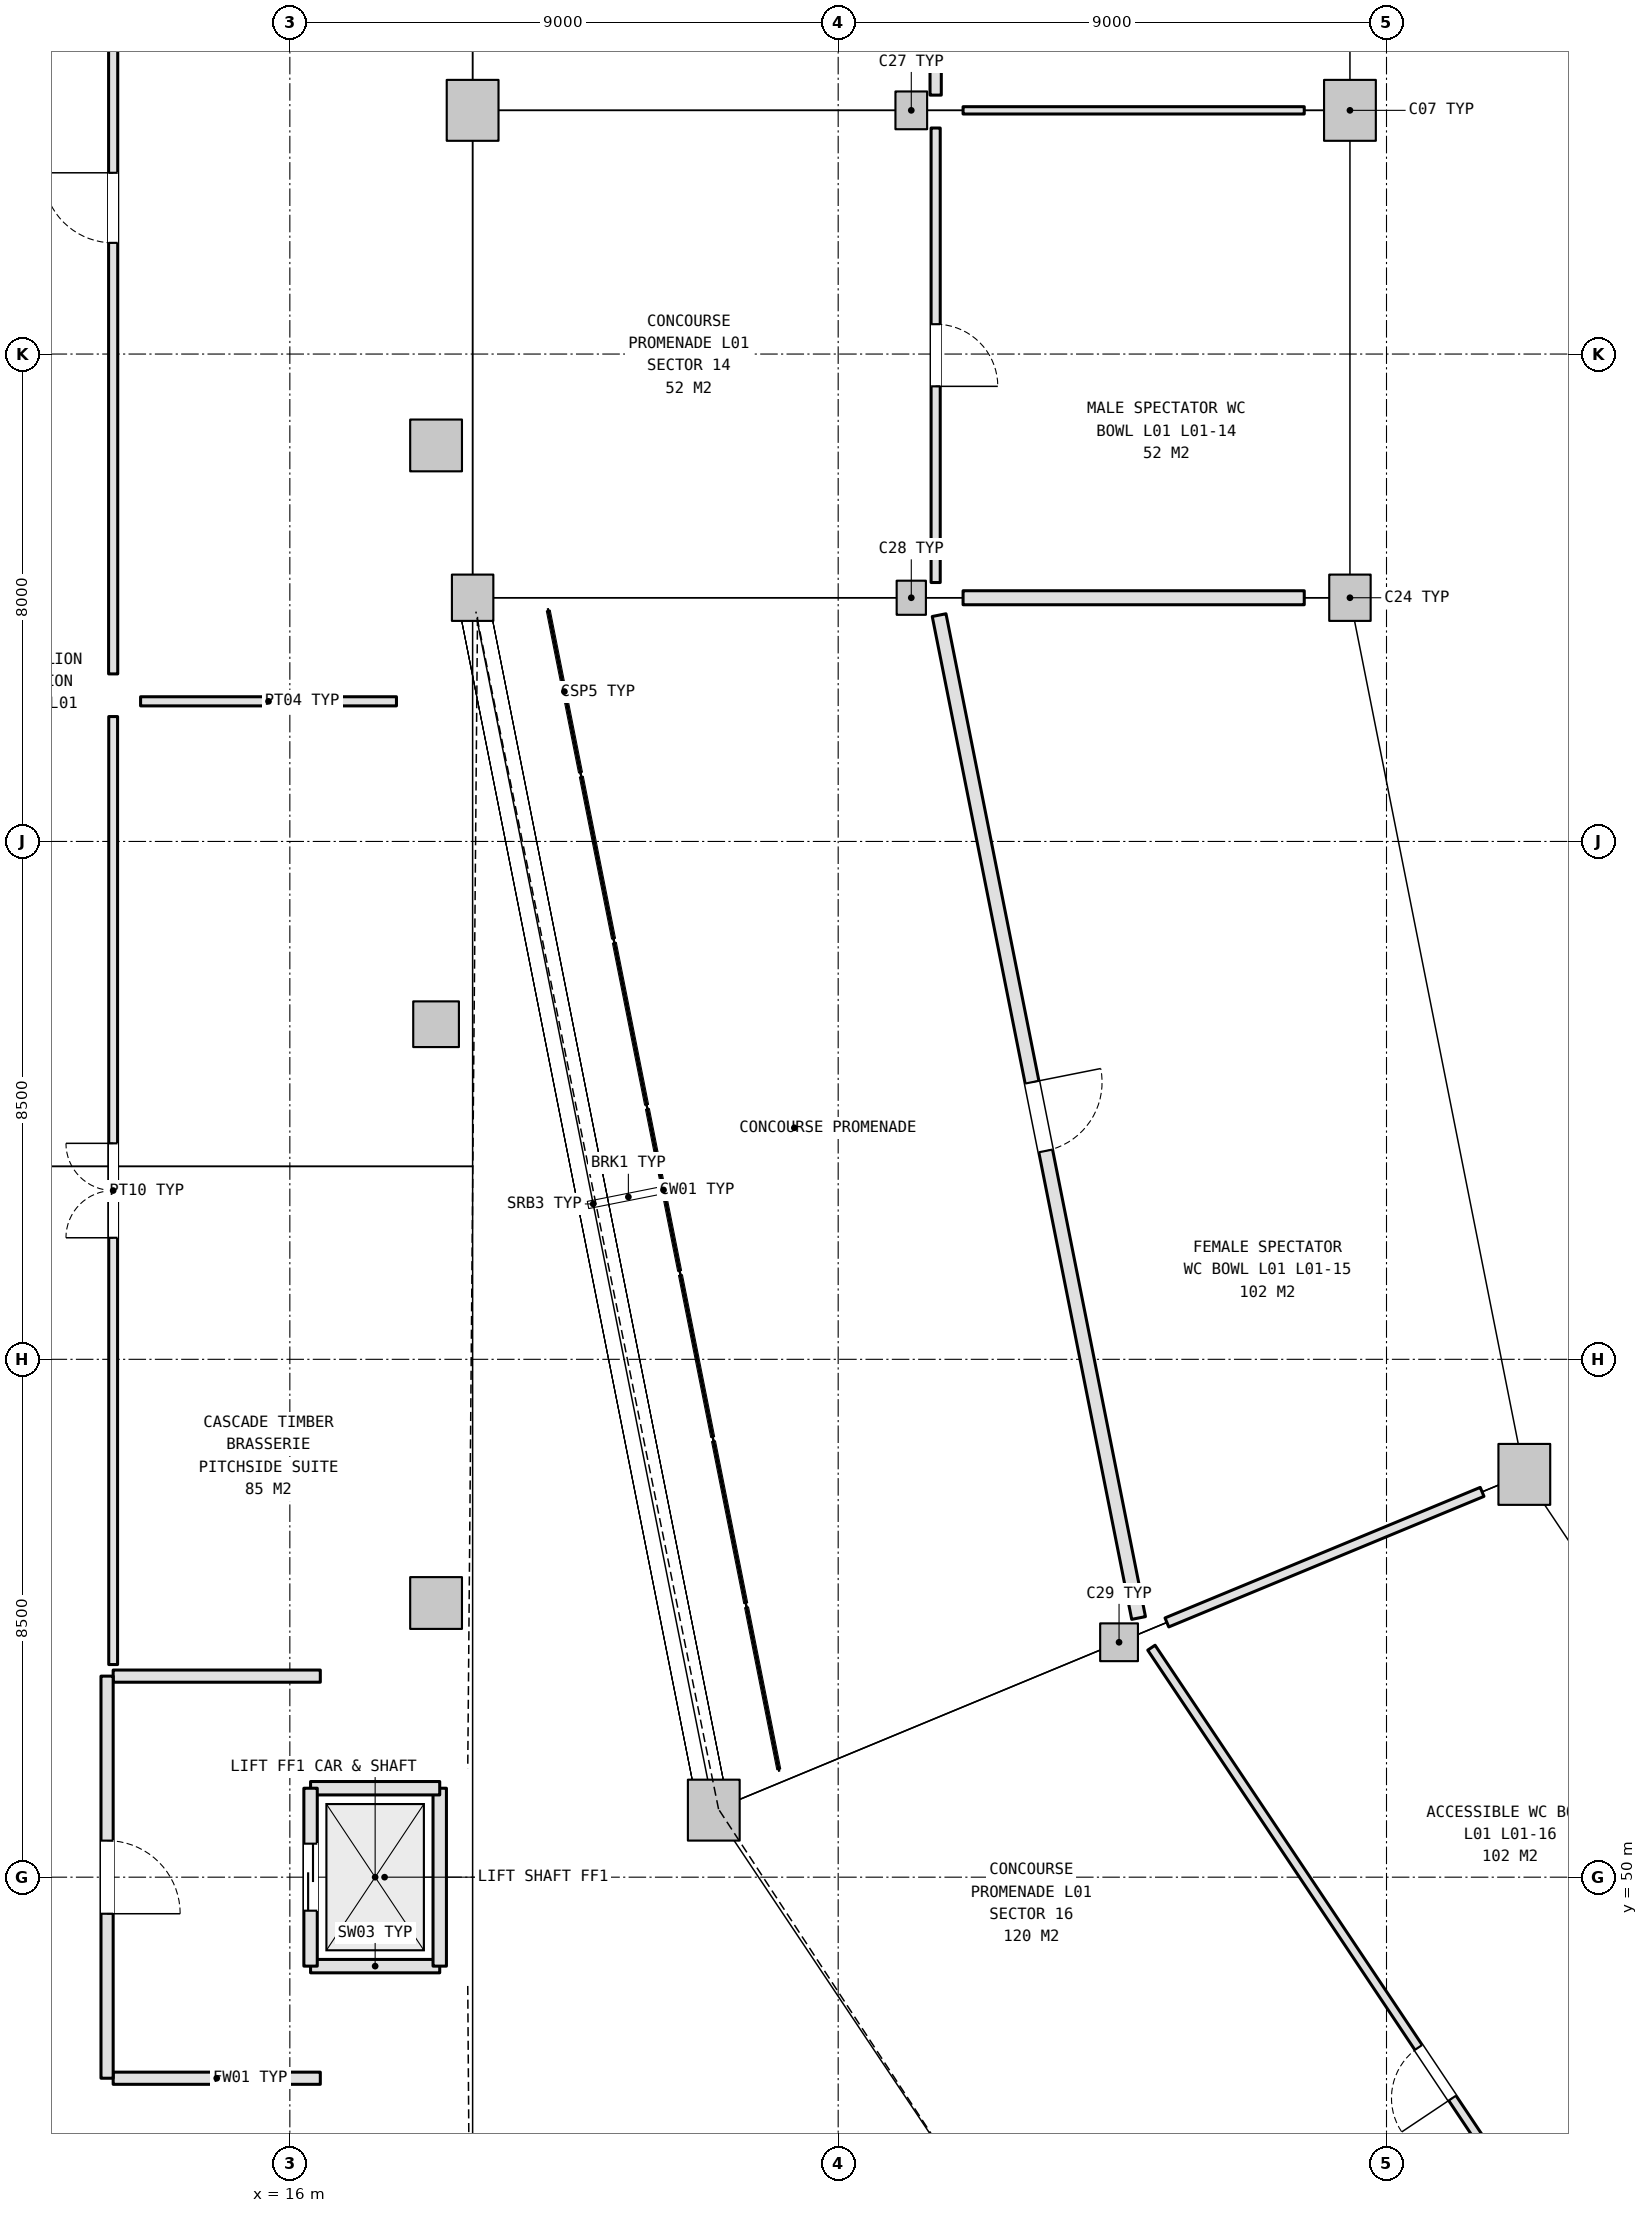
"""IFC4 building model, lengths in metres.
Left out: names, types, materials, properties, quantities, classifications, styles, units other than length and angle.
Written with IfcOpenShell. Run it as: python <this file> out.ifc"""

import sys

from ifc_helpers import new_model, si_unit, direction, frame, frame_2d, origin, origin_2d, place, context, subcontext, project, spatial, rectangle, extrude, element, fill, save


model = new_model("IFC4")
c1 = context("Model", 3, precision=1e-05, world=origin(), true_north=direction((0.0, 1.0)))
c2 = subcontext(c1, "Body", "Model", "MODEL_VIEW")
j1 = project(units=[si_unit("LENGTHUNIT", "METRE"), si_unit("PLANEANGLEUNIT", "RADIAN")], contexts=[c1])
p1 = place(None, origin())
s1 = spatial("IfcSite", under=j1, at=p1, CompositionType="ELEMENT")
p2 = place(p1, origin())
s2 = spatial("IfcBuilding", under=s1, at=p2, CompositionType="ELEMENT")
p3 = place(p2, frame((0.0, 0.0, 5.4)))
s3 = spatial("IfcBuildingStorey", under=s2, at=p3, CompositionType="ELEMENT", Elevation=5.4)
p4 = place(p3, frame((33.4, 79.0, 0.0), z_axis=(0.0, 0.0, 1.0), x_axis=(1.0, 0.0, 0.0)))
e1 = element("IfcColumn", 1, at=p4, inside=s3, PredefinedType="COLUMN", context=c2, shape_type="SweptSolid", body=[
    extrude(rectangle(XDim=0.85, YDim=1.0, at=origin_2d()), origin(), (0.0, 0.0, 1.0), 5.4),
])
p5 = place(p3, frame((26.2, 79.0, 0.0), z_axis=(0.0, 0.0, 1.0), x_axis=(1.0, 0.0, 0.0)))
e2 = element("IfcColumn", 2, at=p5, inside=s3, PredefinedType="COLUMN", context=c2, shape_type="SweptSolid", body=[
    extrude(rectangle(XDim=0.52, YDim=0.62, at=origin_2d()), origin(), (0.0, 0.0, 1.0), 5.4),
])
p6 = place(p3, frame((19.0, 79.0, 0.0), z_axis=(0.0, 0.0, 1.0), x_axis=(1.0, 0.0, 0.0)))
e3 = element("IfcColumn", 3, at=p6, inside=s3, PredefinedType="COLUMN", context=c2, shape_type="SweptSolid", body=[
    extrude(rectangle(XDim=0.85, YDim=1.0, at=origin_2d()), origin(), (0.0, 0.0, 1.0), 5.4),
])
p7 = place(p3, frame((33.4, 71.0, 0.0), z_axis=(0.0, 0.0, 1.0), x_axis=(1.0, 0.0, 0.0)))
e4 = element("IfcColumn", 4, at=p7, inside=s3, PredefinedType="COLUMN", context=c2, shape_type="SweptSolid", body=[
    extrude(rectangle(XDim=0.68, YDim=0.76, at=origin_2d()), origin(), (0.0, 0.0, 1.0), 5.4),
])
p8 = place(p3, frame((26.2, 71.0, 0.0), z_axis=(0.0, 0.0, 1.0), x_axis=(1.0, 0.0, 0.0)))
e5 = element("IfcColumn", 5, at=p8, inside=s3, PredefinedType="COLUMN", context=c2, shape_type="SweptSolid", body=[
    extrude(rectangle(XDim=0.48, YDim=0.56, at=origin_2d()), origin(), (0.0, 0.0, 1.0), 5.4),
])
p9 = place(p3, frame((19.0, 71.0, 0.0), z_axis=(0.0, 0.0, 1.0), x_axis=(1.0, 0.0, 0.0)))
e6 = element("IfcColumn", 6, at=p9, inside=s3, PredefinedType="COLUMN", context=c2, shape_type="SweptSolid", body=[
    extrude(rectangle(XDim=0.68, YDim=0.76, at=origin_2d()), origin(), (0.0, 0.0, 1.0), 5.4),
])
p10 = place(p3, frame((36.262, 56.611, 0.0), z_axis=(0.0, 0.0, 1.0), x_axis=(1.0, 0.0, 0.0)))
e7 = element("IfcColumn", 7, at=p10, inside=s3, PredefinedType="COLUMN", context=c2, shape_type="SweptSolid", body=[
    extrude(rectangle(XDim=0.85, YDim=1.0, at=origin_2d()), origin(), (0.0, 0.0, 1.0), 5.4),
])
p11 = place(p3, frame((29.61, 53.856, 0.0), z_axis=(0.0, 0.0, 1.0), x_axis=(1.0, 0.0, 0.0)))
e8 = element("IfcColumn", 8, at=p11, inside=s3, PredefinedType="COLUMN", context=c2, shape_type="SweptSolid", body=[
    extrude(rectangle(XDim=0.62, YDim=0.62, at=origin_2d()), origin(), (0.0, 0.0, 1.0), 5.4),
])
p12 = place(p3, frame((22.958, 51.1, 0.0), z_axis=(0.0, 0.0, 1.0), x_axis=(1.0, 0.0, 0.0)))
e9 = element("IfcColumn", 9, at=p12, inside=s3, PredefinedType="COLUMN", context=c2, shape_type="SweptSolid", body=[
    extrude(rectangle(XDim=0.85, YDim=1.0, at=origin_2d()), origin(), (0.0, 0.0, 1.0), 5.4),
])
p13 = place(p3, frame((18.4, 54.5, 0.0), z_axis=(0.0, 0.0, 1.0), x_axis=(1.0, 0.0, 0.0)))
e10 = element("IfcColumn", 10, at=p13, inside=s3, PredefinedType="COLUMN", context=c2, shape_type="SweptSolid", body=[
    extrude(rectangle(XDim=0.85, YDim=0.85, at=origin_2d()), origin(), (0.0, 0.0, 1.0), 5.4),
])
p14 = place(p3, frame((18.4, 64.0, 0.0), z_axis=(0.0, 0.0, 1.0), x_axis=(1.0, 0.0, 0.0)))
e11 = element("IfcColumn", 11, at=p14, inside=s3, PredefinedType="COLUMN", context=c2, shape_type="SweptSolid", body=[
    extrude(rectangle(XDim=0.75, YDim=0.75, at=origin_2d()), origin(), (0.0, 0.0, 1.0), 5.4),
])
p15 = place(p3, frame((18.4, 73.5, 0.0), z_axis=(0.0, 0.0, 1.0), x_axis=(1.0, 0.0, 0.0)))
e12 = element("IfcColumn", 12, at=p15, inside=s3, PredefinedType="COLUMN", context=c2, shape_type="SweptSolid", body=[
    extrude(rectangle(XDim=0.85, YDim=0.85, at=origin_2d()), origin(), (0.0, 0.0, 1.0), 5.4),
])
p16 = place(p3, frame((16.34, 48.54, 0.0), z_axis=(0.0, 0.0, 1.0), x_axis=(1.0, 0.0, 0.0)))
e13 = element("IfcWall", 13, at=p16, inside=s3, PredefinedType="SHEAR", context=c2, shape_type="SweptSolid", body=[
    extrude(rectangle(XDim=2.12, YDim=0.22, at=frame_2d((1.06, 0.0))), origin(), (0.0, 0.0, 1.0), 5.14),
])
p17 = place(p3, frame((18.46, 48.54, 0.0), z_axis=(0.0, 0.0, 1.0), x_axis=(0.0, 1.0, 0.0)))
e14 = element("IfcWall", 14, at=p17, inside=s3, PredefinedType="SHEAR", context=c2, shape_type="SweptSolid", body=[
    extrude(rectangle(XDim=2.92, YDim=0.22, at=frame_2d((1.46, 0.0))), origin(), (0.0, 0.0, 1.0), 5.14),
])
p18 = place(p3, frame((18.46, 51.46, 0.0), z_axis=(0.0, 0.0, 1.0), x_axis=(-1.0, 0.0, 0.0)))
e15 = element("IfcWall", 15, at=p18, inside=s3, PredefinedType="SHEAR", context=c2, shape_type="SweptSolid", body=[
    extrude(rectangle(XDim=2.12, YDim=0.22, at=frame_2d((1.06, 0.0))), origin(), (0.0, 0.0, 1.0), 5.14),
])
p19 = place(p3, frame((16.34, 51.46, 0.0), z_axis=(0.0, 0.0, 1.0), x_axis=(0.0, -1.0, 0.0)))
e16 = element("IfcWall", 16, at=p19, inside=s3, PredefinedType="SHEAR", context=c2, shape_type="SweptSolid", body=[
    extrude(rectangle(XDim=2.92, YDim=0.22, at=frame_2d((1.46, 0.0))), origin(), (0.0, 0.0, 1.0), 5.14),
])
p20 = place(p19, frame((0.91, 0.0, 0.0)))
e17 = element("IfcOpeningElement", 17, at=p20, cuts=e16, PredefinedType="OPENING", context=c2, shape_type="SweptSolid", body=[
    extrude(rectangle(XDim=1.1, YDim=2.2, at=frame_2d((0.55, 1.1))), frame((0.0, 0.12, 0.0), z_axis=(0.0, -1.0, 0.0), x_axis=(1.0, 0.0, 0.0)), (0.0, 0.0, 1.0), 0.24),
])
for number, where, z_axis, x_axis in (
    (18, (13.1, 46.7, 0.0), (0.0, 0.0, 1.0), (1.0, 0.0, 0.0)),
    (19, (16.5, 53.3, 0.0), (0.0, 0.0, 1.0), (-1.0, 0.0, 0.0)),
):
    element("IfcWall", number, at=place(p3, frame(where, z_axis=z_axis, x_axis=x_axis)), inside=s3, PredefinedType="SOLIDWALL", context=c2, shape_type="SweptSolid", body=[
        extrude(rectangle(XDim=3.4, YDim=0.2, at=frame_2d((1.7, 0.0))), origin(), (0.0, 0.0, 1.0), 5.12),
    ])
p21 = place(p3, frame((13.0, 53.3, 0.0), z_axis=(0.0, 0.0, 1.0), x_axis=(0.0, -1.0, 0.0)))
e20 = element("IfcWall", 20, at=p21, inside=s3, PredefinedType="SOLIDWALL", context=c2, shape_type="SweptSolid", body=[
    extrude(rectangle(XDim=6.6, YDim=0.2, at=frame_2d((3.3, 0.0))), origin(), (0.0, 0.0, 1.0), 5.12),
])
p22 = place(p21, frame((2.7, 0.0, 0.0)))
e21 = element("IfcOpeningElement", 21, at=p22, cuts=e20, PredefinedType="OPENING", context=c2, shape_type="SweptSolid", body=[
    extrude(rectangle(XDim=1.2, YDim=2.2, at=frame_2d((0.6, 1.1))), frame((0.0, 0.11, 0.0), z_axis=(0.0, -1.0, 0.0), x_axis=(1.0, 0.0, 0.0)), (0.0, 0.0, 1.0), 0.22),
])
p23 = place(p3, frame((13.1, 53.49, 0.0), z_axis=(0.0, 0.0, 1.0), x_axis=(0.0, 1.0, 0.0)))
e22 = element("IfcWall", 22, at=p23, inside=s3, PredefinedType="PARTITIONING", context=c2, shape_type="SweptSolid", body=[
    extrude(rectangle(XDim=15.56, YDim=0.145, at=frame_2d((7.78, 0.0))), origin(), (0.0, 0.0, 1.0), 4.668),
])
p24 = place(p23, frame((7.005, 0.0, 0.0)))
e23 = element("IfcOpeningElement", 23, at=p24, cuts=e22, PredefinedType="OPENING", context=c2, shape_type="SweptSolid", body=[
    extrude(rectangle(XDim=1.55, YDim=2.15, at=frame_2d((0.775, 1.075))), frame((0.0, 0.083, 0.0), z_axis=(0.0, -1.0, 0.0), x_axis=(1.0, 0.0, 0.0)), (0.0, 0.0, 1.0), 0.165),
])
p25 = place(p3, frame((13.55, 69.3, 0.0), z_axis=(0.0, 0.0, 1.0), x_axis=(1.0, 0.0, 0.0)))
e24 = element("IfcWall", 24, at=p25, inside=s3, PredefinedType="PARTITIONING", context=c2, shape_type="SweptSolid", body=[
    extrude(rectangle(XDim=4.2, YDim=0.15, at=frame_2d((2.1, 0.0))), origin(), (0.0, 0.0, 1.0), 5.12),
])
p26 = place(p3, frame((13.1, 69.75, 0.0), z_axis=(0.0, 0.0, 1.0), x_axis=(0.0, 1.0, 0.0)))
e25 = element("IfcWall", 25, at=p26, inside=s3, PredefinedType="PARTITIONING", context=c2, shape_type="SweptSolid", body=[
    extrude(rectangle(XDim=15.3, YDim=0.15, at=frame_2d((7.65, 0.0))), origin(), (0.0, 0.0, 1.0), 4.668),
])
p27 = place(p26, frame((7.075, 0.0, 0.0)))
e26 = element("IfcOpeningElement", 26, at=p27, cuts=e25, PredefinedType="OPENING", context=c2, shape_type="SweptSolid", body=[
    extrude(rectangle(XDim=1.15, YDim=2.2, at=frame_2d((0.575, 1.1))), frame((0.0, 0.085, 0.0), z_axis=(0.0, -1.0, 0.0), x_axis=(1.0, 0.0, 0.0)), (0.0, 0.0, 1.0), 0.17),
])
p28 = place(p3, frame((26.6, 79.25, 0.0), z_axis=(0.0, 0.0, 1.0), x_axis=(0.0, 1.0, 0.0)))
e27 = element("IfcWall", 27, at=p28, inside=s3, PredefinedType="PARTITIONING", context=c2, shape_type="SweptSolid", body=[
    extrude(rectangle(XDim=7.46, YDim=0.185, at=frame_2d((3.73, 0.0))), origin(), (0.0, 0.0, 1.0), 4.375),
])
p29 = place(p28, frame((3.24, 0.0, 0.0)))
e28 = element("IfcOpeningElement", 28, at=p29, cuts=e27, PredefinedType="OPENING", context=c2, shape_type="SweptSolid", body=[
    extrude(rectangle(XDim=0.98, YDim=2.15, at=frame_2d((0.49, 1.075))), frame((0.0, 0.103, 0.0), z_axis=(0.0, -1.0, 0.0), x_axis=(1.0, 0.0, 0.0)), (0.0, 0.0, 1.0), 0.205),
])
p30 = place(p3, frame((32.65, 79.0, 0.0), z_axis=(0.0, 0.0, 1.0), x_axis=(-1.0, 0.0, 0.0)))
e29 = element("IfcWall", 29, at=p30, inside=s3, PredefinedType="PARTITIONING", context=c2, shape_type="SweptSolid", body=[
    extrude(rectangle(XDim=5.6, YDim=0.12, at=frame_2d((2.8, 0.0))), origin(), (0.0, 0.0, 1.0), 4.365),
])
p31 = place(p3, frame((26.6, 71.25, 0.0), z_axis=(0.0, 0.0, 1.0), x_axis=(0.0, 1.0, 0.0)))
e30 = element("IfcWall", 30, at=p31, inside=s3, PredefinedType="PARTITIONING", context=c2, shape_type="SweptSolid", body=[
    extrude(rectangle(XDim=7.46, YDim=0.15, at=frame_2d((3.73, 0.0))), origin(), (0.0, 0.0, 1.0), 4.365),
])
p32 = place(p31, frame((3.22, 0.0, 0.0)))
e31 = element("IfcOpeningElement", 31, at=p32, cuts=e30, PredefinedType="OPENING", context=c2, shape_type="SweptSolid", body=[
    extrude(rectangle(XDim=1.02, YDim=2.15, at=frame_2d((0.51, 1.075))), frame((0.0, 0.085, 0.0), z_axis=(0.0, -1.0, 0.0), x_axis=(1.0, 0.0, 0.0)), (0.0, 0.0, 1.0), 0.17),
])
p33 = place(p3, frame((32.65, 71.0, 0.0), z_axis=(0.0, 0.0, 1.0), x_axis=(-1.0, 0.0, 0.0)))
e32 = element("IfcWall", 32, at=p33, inside=s3, PredefinedType="PLUMBINGWALL", context=c2, shape_type="SweptSolid", body=[
    extrude(rectangle(XDim=5.6, YDim=0.23, at=frame_2d((2.8, 0.0))), origin(), (0.0, 0.0, 1.0), 4.385),
])
p34 = place(p3, frame((29.931, 54.254, 0.0), z_axis=(0.0, 0.0, 1.0), x_axis=(-0.195086564225, 0.980786027867, 0.0)))
e33 = element("IfcWall", 33, at=p34, inside=s3, PredefinedType="PLUMBINGWALL", context=c2, shape_type="SweptSolid", body=[
    extrude(rectangle(XDim=16.783, YDim=0.23, at=frame_2d((8.392, 0.0))), origin(), (0.0, 0.0, 1.0), 4.305),
])
p35 = place(p34, frame((7.817, 0.0, 0.0)))
e34 = element("IfcOpeningElement", 34, at=p35, cuts=e33, PredefinedType="OPENING", context=c2, shape_type="SweptSolid", body=[
    extrude(rectangle(XDim=1.15, YDim=2.2, at=frame_2d((0.575, 1.1))), frame((0.0, 0.125, 0.0), z_axis=(0.0, -1.0, 0.0), x_axis=(1.0, 0.0, 0.0)), (0.0, 0.0, 1.0), 0.25),
])
p36 = place(p3, frame((35.569, 56.324, 0.0), z_axis=(0.0, 0.0, 1.0), x_axis=(-0.923879745429, -0.382682918336, 0.0)))
e35 = element("IfcWall", 35, at=p36, inside=s3, PredefinedType="PARTITIONING", context=c2, shape_type="SweptSolid", body=[
    extrude(rectangle(XDim=5.6, YDim=0.16, at=frame_2d((2.8, 0.0))), origin(), (0.0, 0.0, 1.0), 4.305),
])
p37 = place(p3, frame((39.466, 39.812, 0.0), z_axis=(0.0, 0.0, 1.0), x_axis=(-0.555572701103, 0.831467963177, 0.0)))
e36 = element("IfcWall", 36, at=p37, inside=s3, PredefinedType="PARTITIONING", context=c2, shape_type="SweptSolid", body=[
    extrude(rectangle(XDim=16.783, YDim=0.145, at=frame_2d((8.392, 0.0))), origin(), (0.0, 0.0, 1.0), 4.305),
])
p38 = place(p37, frame((7.892, 0.0, 0.0)))
e37 = element("IfcOpeningElement", 37, at=p38, cuts=e36, PredefinedType="OPENING", context=c2, shape_type="SweptSolid", body=[
    extrude(rectangle(XDim=1.0, YDim=2.1, at=frame_2d((0.5, 1.05))), frame((0.0, 0.083, 0.0), z_axis=(0.0, -1.0, 0.0), x_axis=(1.0, 0.0, 0.0)), (0.0, 0.0, 1.0), 0.165),
])
p39 = place(p20, origin())
e38 = element("IfcDoor", 38, at=p39, inside=s3, OperationType="DOUBLE_DOOR_SLIDING", PredefinedType="DOOR", context=c2, shape_type="SweptSolid", body=[
    extrude(rectangle(XDim=1.1, YDim=2.2, at=frame_2d((0.55, 1.1))), frame((0.0, 0.025, 0.0), z_axis=(0.0, -1.0, 0.0), x_axis=(1.0, 0.0, 0.0)), (0.0, 0.0, 1.0), 0.05),
])
fill(e17, e38)
p40 = place(p22, origin())
e39 = element("IfcDoor", 39, at=p40, inside=s3, OperationType="SINGLE_SWING_RIGHT", PredefinedType="DOOR", context=c2, shape_type="SweptSolid", body=[
    extrude(rectangle(XDim=1.2, YDim=2.2, at=frame_2d((0.6, 1.1))), frame((0.0, 0.025, 0.0), z_axis=(0.0, -1.0, 0.0), x_axis=(1.0, 0.0, 0.0)), (0.0, 0.0, 1.0), 0.05),
])
fill(e21, e39)
p41 = place(p24, origin())
e40 = element("IfcDoor", 40, at=p41, inside=s3, OperationType="DOUBLE_DOOR_SINGLE_SWING", PredefinedType="DOOR", context=c2, shape_type="SweptSolid", body=[
    extrude(rectangle(XDim=1.55, YDim=2.15, at=frame_2d((0.775, 1.075))), frame((0.0, 0.025, 0.0), z_axis=(0.0, -1.0, 0.0), x_axis=(1.0, 0.0, 0.0)), (0.0, 0.0, 1.0), 0.05),
])
fill(e23, e40)
p42 = place(p27, origin())
e41 = element("IfcDoor", 41, at=p42, inside=s3, OperationType="SINGLE_SWING_RIGHT", PredefinedType="DOOR", context=c2, shape_type="SweptSolid", body=[
    extrude(rectangle(XDim=1.15, YDim=2.2, at=frame_2d((0.575, 1.1))), frame((0.0, 0.025, 0.0), z_axis=(0.0, -1.0, 0.0), x_axis=(1.0, 0.0, 0.0)), (0.0, 0.0, 1.0), 0.05),
])
fill(e26, e41)
p43 = place(p32, frame((1.02, 0.0, 0.0), z_axis=(0.0, 0.0, 1.0), x_axis=(-1.0, 0.0, 0.0)))
e42 = element("IfcDoor", 42, at=p43, inside=s3, OperationType="SINGLE_SWING_LEFT", PredefinedType="DOOR", context=c2, shape_type="SweptSolid", body=[
    extrude(rectangle(XDim=1.02, YDim=2.15, at=frame_2d((0.51, 1.075))), frame((0.0, 0.025, 0.0), z_axis=(0.0, -1.0, 0.0), x_axis=(1.0, 0.0, 0.0)), (0.0, 0.0, 1.0), 0.05),
])
fill(e31, e42)
p44 = place(p35, frame((1.15, 0.0, 0.0), z_axis=(0.0, 0.0, 1.0), x_axis=(-1.0, 0.0, 0.0)))
e43 = element("IfcDoor", 43, at=p44, inside=s3, OperationType="SINGLE_SWING_RIGHT", PredefinedType="DOOR", context=c2, shape_type="SweptSolid", body=[
    extrude(rectangle(XDim=1.15, YDim=2.2, at=frame_2d((0.575, 1.1))), frame((0.0, 0.025, 0.0), z_axis=(0.0, -1.0, 0.0), x_axis=(1.0, 0.0, 0.0)), (0.0, 0.0, 1.0), 0.05),
])
fill(e34, e43)
p45 = place(p38, origin())
e44 = element("IfcDoor", 44, at=p45, inside=s3, OperationType="SINGLE_SWING_LEFT", PredefinedType="DOOR", context=c2, shape_type="SweptSolid", body=[
    extrude(rectangle(XDim=1.0, YDim=2.1, at=frame_2d((0.5, 1.05))), frame((0.0, 0.025, 0.0), z_axis=(0.0, -1.0, 0.0), x_axis=(1.0, 0.0, 0.0)), (0.0, 0.0, 1.0), 0.05),
])
fill(e37, e44)
save(model, sys.argv[1])
